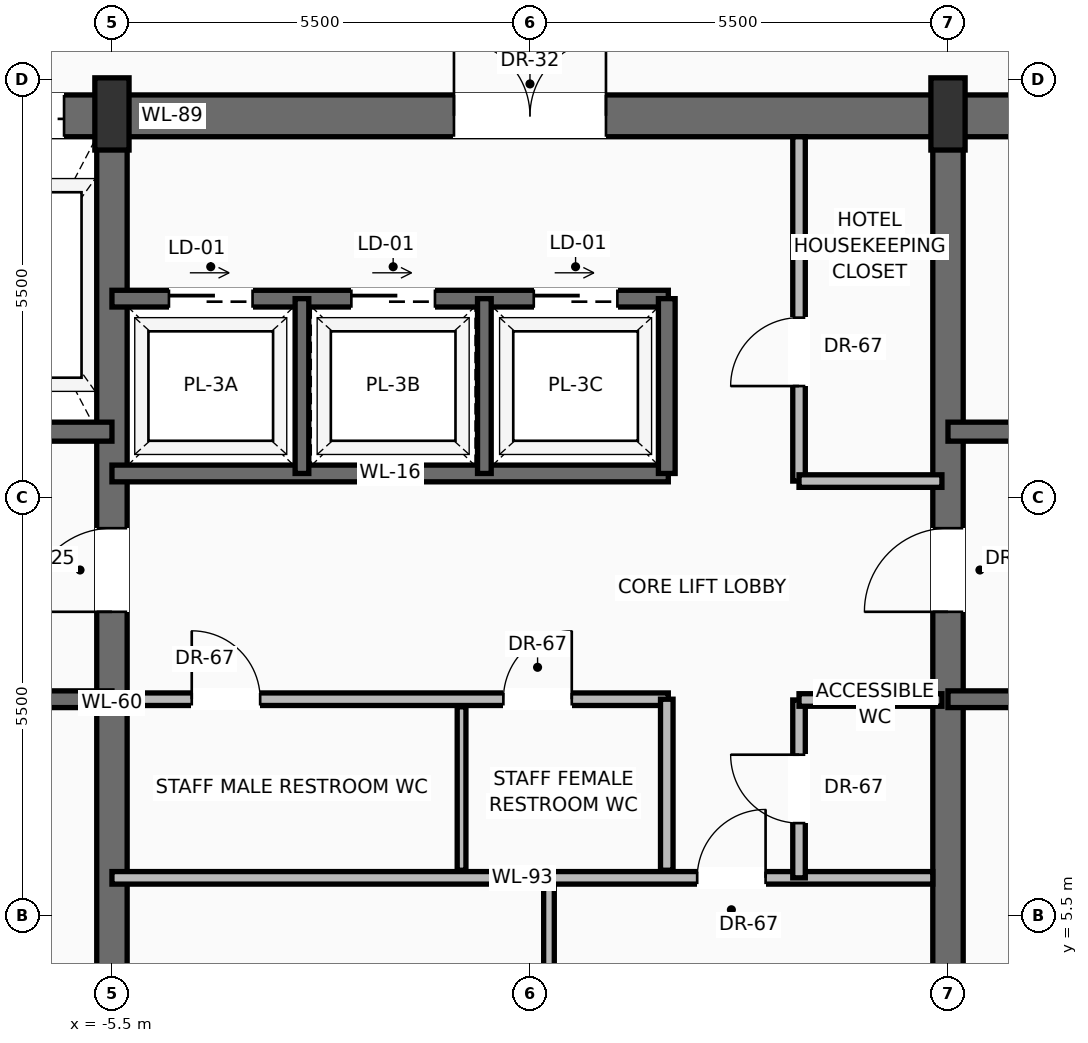
"""IFC4 building model, lengths in metres.
Left out: names, types, materials, properties, quantities, classifications, styles, units other than length and angle.
Written with IfcOpenShell. Run it as: python <this file> out.ifc"""

import sys

from ifc_helpers import new_model, si_unit, direction, frame, frame_2d, origin, origin_2d, place, context, subcontext, project, spatial, rectangle, extrude, source, transform, mapped, element, fill, save


model = new_model("IFC4")
c1 = context("Model", 3, precision=1e-05, world=origin(), true_north=direction((0.0, 1.0)))
c2 = subcontext(c1, "Body", "Model", "MODEL_VIEW")
j1 = project(units=[si_unit("LENGTHUNIT", "METRE"), si_unit("PLANEANGLEUNIT", "RADIAN")], contexts=[c1])
p1 = place(None, origin())
s1 = spatial("IfcSite", under=j1, at=p1, CompositionType="ELEMENT")
p2 = place(p1, origin())
s2 = spatial("IfcBuilding", under=s1, at=p2, CompositionType="ELEMENT")
p3 = place(p2, frame((0.0, 0.0, 244.15)))
s3 = spatial("IfcBuildingStorey", under=s2, at=p3, CompositionType="ELEMENT", Elevation=244.15)
p4 = place(p3, frame((-10.7, 16.025, 0.0), z_axis=(0.0, 0.0, 1.0), x_axis=(1.0, 0.0, 0.0)))
e1 = element("IfcWall", 1, at=p4, inside=s3, PredefinedType="SHEAR", context=c2, shape_type="SweptSolid", body=[
    extrude(rectangle(XDim=21.4, YDim=0.55, at=frame_2d((10.7, 0.0))), origin(), (0.0, 0.0, 1.0), 3.24),
])
p5 = place(p4, frame((3.27, 0.0, 0.0)))
e2 = element("IfcOpeningElement", 2, at=p5, cuts=e1, PredefinedType="OPENING", context=c2, shape_type="SweptSolid", body=[
    extrude(rectangle(XDim=1.3, YDim=2.3, at=frame_2d((0.65, 1.15))), frame((0.0, 0.285, 0.0), z_axis=(0.0, -1.0, 0.0), x_axis=(1.0, 0.0, 0.0)), (0.0, 0.0, 1.0), 0.57),
])
p6 = place(p4, frame((9.7, 0.0, 0.0)))
e3 = element("IfcOpeningElement", 3, at=p6, cuts=e1, PredefinedType="OPENING", context=c2, shape_type="SweptSolid", body=[
    extrude(rectangle(XDim=2.0, YDim=2.4, at=frame_2d((1.0, 1.2))), frame((0.0, 0.285, 0.0), z_axis=(0.0, -1.0, 0.0), x_axis=(1.0, 0.0, 0.0)), (0.0, 0.0, 1.0), 0.57),
])
p7 = place(p3, frame((-5.5, 0.575, 0.0), z_axis=(0.0, 0.0, 1.0), x_axis=(0.0, 1.0, 0.0)))
e4 = element("IfcWall", 4, at=p7, inside=s3, PredefinedType="SHEAR", context=c2, shape_type="SweptSolid", body=[
    extrude(rectangle(XDim=15.45, YDim=0.4, at=frame_2d((7.725, 0.0))), origin(), (0.0, 0.0, 1.0), 3.24),
])
p8 = place(p7, frame((8.925, 0.0, 0.0)))
e5 = element("IfcOpeningElement", 5, at=p8, cuts=e4, PredefinedType="OPENING", context=c2, shape_type="SweptSolid", body=[
    extrude(rectangle(XDim=1.1, YDim=2.2, at=frame_2d((0.55, 1.1))), frame((0.0, 0.21, 0.0), z_axis=(0.0, -1.0, 0.0), x_axis=(1.0, 0.0, 0.0)), (0.0, 0.0, 1.0), 0.42),
])
p9 = place(p3, frame((5.5, 0.575, 0.0), z_axis=(0.0, 0.0, 1.0), x_axis=(0.0, 1.0, 0.0)))
e6 = element("IfcWall", 6, at=p9, inside=s3, PredefinedType="SHEAR", context=c2, shape_type="SweptSolid", body=[
    extrude(rectangle(XDim=15.45, YDim=0.4, at=frame_2d((7.725, 0.0))), origin(), (0.0, 0.0, 1.0), 3.24),
])
p10 = place(p9, frame((8.925, 0.0, 0.0)))
e7 = element("IfcOpeningElement", 7, at=p10, cuts=e6, PredefinedType="OPENING", context=c2, shape_type="SweptSolid", body=[
    extrude(rectangle(XDim=1.1, YDim=2.2, at=frame_2d((0.55, 1.1))), frame((0.0, 0.21, 0.0), z_axis=(0.0, -1.0, 0.0), x_axis=(1.0, 0.0, 0.0)), (0.0, 0.0, 1.0), 0.42),
])
m1 = source(origin(), c2, "Body", "SweptSolid", [
    extrude(rectangle(XDim=0.45, YDim=0.95, at=origin_2d()), origin(), (0.0, 0.0, 1.0), 3.45),
])
for number, where, z_axis, x_axis in (
    (8, (-5.5, 16.05, 0.0), (0.0, 0.0, 1.0), (1.0, 0.0, 0.0)),
    (9, (5.5, 16.05, 0.0), (0.0, 0.0, 1.0), (1.0, 0.0, 0.0)),
):
    element("IfcColumn", number, at=place(p3, frame(where, z_axis=z_axis, x_axis=x_axis)), inside=s3, PredefinedType="PILASTER", context=c2, shape_type="MappedRepresentation", body=[
        mapped(m1, transform((0.0, 0.0, 0.0), scale=1.0)),
    ])
p11 = place(p3, frame((-5.5, 8.35, 0.0), z_axis=(0.0, 0.0, 1.0), x_axis=(-1.0, 0.0, 0.0)))
e10 = element("IfcWall", 10, at=p11, inside=s3, PredefinedType="SOLIDWALL", context=c2, shape_type="SweptSolid", body=[
    extrude(rectangle(XDim=4.65, YDim=0.22, at=frame_2d((2.325, 0.0))), origin(), (0.0, 0.0, 1.0), 3.24),
])
p12 = place(p11, frame((2.5, 0.0, 0.0)))
e11 = element("IfcOpeningElement", 11, at=p12, cuts=e10, PredefinedType="OPENING", context=c2, shape_type="SweptSolid", body=[
    extrude(rectangle(XDim=1.15, YDim=2.2, at=frame_2d((0.575, 1.1))), frame((0.0, 0.12, 0.0), z_axis=(0.0, -1.0, 0.0), x_axis=(1.0, 0.0, 0.0)), (0.0, 0.0, 1.0), 0.24),
])
p13 = place(p3, frame((-5.5, 11.87, 0.0), z_axis=(0.0, 0.0, 1.0), x_axis=(-1.0, 0.0, 0.0)))
e12 = element("IfcWall", 12, at=p13, inside=s3, PredefinedType="SOLIDWALL", context=c2, shape_type="SweptSolid", body=[
    extrude(rectangle(XDim=4.65, YDim=0.25, at=frame_2d((2.325, 0.0))), origin(), (0.0, 0.0, 1.0), 3.24),
])
p14 = place(p13, frame((2.95, 0.0, 0.0)))
e13 = element("IfcOpeningElement", 13, at=p14, cuts=e12, PredefinedType="OPENING", context=c2, shape_type="SweptSolid", body=[
    extrude(rectangle(XDim=1.2, YDim=2.25, at=frame_2d((0.6, 1.125))), frame((0.0, 0.135, 0.0), z_axis=(0.0, -1.0, 0.0), x_axis=(1.0, 0.0, 0.0)), (0.0, 0.0, 1.0), 0.27),
])
p15 = place(p3, frame((10.15, 8.35, 0.0), z_axis=(0.0, 0.0, 1.0), x_axis=(-1.0, 0.0, 0.0)))
e14 = element("IfcWall", 14, at=p15, inside=s3, PredefinedType="SOLIDWALL", context=c2, shape_type="SweptSolid", body=[
    extrude(rectangle(XDim=4.65, YDim=0.22, at=frame_2d((2.325, 0.0))), origin(), (0.0, 0.0, 1.0), 3.24),
])
p16 = place(p15, frame((1.0, 0.0, 0.0)))
e15 = element("IfcOpeningElement", 15, at=p16, cuts=e14, PredefinedType="OPENING", context=c2, shape_type="SweptSolid", body=[
    extrude(rectangle(XDim=1.15, YDim=2.2, at=frame_2d((0.575, 1.1))), frame((0.0, 0.12, 0.0), z_axis=(0.0, -1.0, 0.0), x_axis=(1.0, 0.0, 0.0)), (0.0, 0.0, 1.0), 0.24),
])
p17 = place(p3, frame((10.15, 11.87, 0.0), z_axis=(0.0, 0.0, 1.0), x_axis=(-1.0, 0.0, 0.0)))
e16 = element("IfcWall", 16, at=p17, inside=s3, PredefinedType="SOLIDWALL", context=c2, shape_type="SweptSolid", body=[
    extrude(rectangle(XDim=4.65, YDim=0.25, at=frame_2d((2.325, 0.0))), origin(), (0.0, 0.0, 1.0), 3.24),
])
p18 = place(p17, frame((0.5, 0.0, 0.0)))
e17 = element("IfcOpeningElement", 17, at=p18, cuts=e16, PredefinedType="OPENING", context=c2, shape_type="SweptSolid", body=[
    extrude(rectangle(XDim=1.2, YDim=2.25, at=frame_2d((0.6, 1.125))), frame((0.0, 0.135, 0.0), z_axis=(0.0, -1.0, 0.0), x_axis=(1.0, 0.0, 0.0)), (0.0, 0.0, 1.0), 0.27),
])
p19 = place(p3, frame((-5.5, 6.0, 0.0), z_axis=(0.0, 0.0, 1.0), x_axis=(1.0, 0.0, 0.0)))
e18 = element("IfcWall", 18, at=p19, inside=s3, PredefinedType="PARTITIONING", context=c2, shape_type="SweptSolid", body=[
    extrude(rectangle(XDim=10.8, YDim=0.165, at=frame_2d((5.4, 0.0))), origin(), (0.0, 0.0, 1.0), 3.232),
])
p20 = place(p19, frame((7.7, 0.0, 0.0)))
e19 = element("IfcOpeningElement", 19, at=p20, cuts=e18, PredefinedType="OPENING", context=c2, shape_type="SweptSolid", body=[
    extrude(rectangle(XDim=0.9, YDim=2.1, at=frame_2d((0.45, 1.05))), frame((0.0, 0.093, 0.0), z_axis=(0.0, -1.0, 0.0), x_axis=(1.0, 0.0, 0.0)), (0.0, 0.0, 1.0), 0.185),
])
p21 = place(p3, frame((0.25, 0.85, 0.0), z_axis=(0.0, 0.0, 1.0), x_axis=(0.0, 1.0, 0.0)))
e20 = element("IfcWall", 20, at=p21, inside=s3, PredefinedType="PARTITIONING", context=c2, shape_type="SweptSolid", body=[
    extrude(rectangle(XDim=5.03, YDim=0.14, at=frame_2d((2.515, 0.0))), origin(), (0.0, 0.0, 1.0), 3.232),
])
p22 = place(p21, frame((2.1, 0.0, 0.0)))
e21 = element("IfcOpeningElement", 21, at=p22, cuts=e20, PredefinedType="OPENING", context=c2, shape_type="SweptSolid", body=[
    extrude(rectangle(XDim=0.9, YDim=2.1, at=frame_2d((0.45, 1.05))), frame((0.0, 0.08, 0.0), z_axis=(0.0, -1.0, 0.0), x_axis=(1.0, 0.0, 0.0)), (0.0, 0.0, 1.0), 0.16),
])
p23 = place(p3, frame((3.54, 6.0, 0.0), z_axis=(0.0, 0.0, 1.0), x_axis=(0.0, 1.0, 0.0)))
e22 = element("IfcWall", 22, at=p23, inside=s3, PredefinedType="PARTITIONING", context=c2, shape_type="SweptSolid", body=[
    extrude(rectangle(XDim=2.34, YDim=0.165, at=frame_2d((1.17, 0.0))), origin(), (0.0, 0.0, 1.0), 3.232),
])
p24 = place(p23, frame((0.72, 0.0, 0.0)))
e23 = element("IfcOpeningElement", 23, at=p24, cuts=e22, PredefinedType="OPENING", context=c2, shape_type="SweptSolid", body=[
    extrude(rectangle(XDim=0.9, YDim=2.1, at=frame_2d((0.45, 1.05))), frame((0.0, 0.093, 0.0), z_axis=(0.0, -1.0, 0.0), x_axis=(1.0, 0.0, 0.0)), (0.0, 0.0, 1.0), 0.185),
])
p25 = place(p3, frame((3.54, 8.34, 0.0), z_axis=(0.0, 0.0, 1.0), x_axis=(1.0, 0.0, 0.0)))
e24 = element("IfcWall", 24, at=p25, inside=s3, PredefinedType="PARTITIONING", context=c2, shape_type="SweptSolid", body=[
    extrude(rectangle(XDim=1.88, YDim=0.165, at=frame_2d((0.94, 0.0))), origin(), (0.0, 0.0, 1.0), 3.232),
])
p26 = place(p3, frame((-5.3, 8.35, 0.0), z_axis=(0.0, 0.0, 1.0), x_axis=(1.0, 0.0, 0.0)))
e25 = element("IfcWall", 25, at=p26, inside=s3, PredefinedType="PARTITIONING", context=c2, shape_type="SweptSolid", body=[
    extrude(rectangle(XDim=7.12, YDim=0.165, at=frame_2d((3.56, 0.0))), origin(), (0.0, 0.0, 1.0), 3.232),
])
p27 = place(p26, frame((0.85, 0.0, 0.0)))
e26 = element("IfcOpeningElement", 26, at=p27, cuts=e25, PredefinedType="OPENING", context=c2, shape_type="SweptSolid", body=[
    extrude(rectangle(XDim=0.9, YDim=2.1, at=frame_2d((0.45, 1.05))), frame((0.0, 0.093, 0.0), z_axis=(0.0, -1.0, 0.0), x_axis=(1.0, 0.0, 0.0)), (0.0, 0.0, 1.0), 0.185),
])
p28 = place(p26, frame((4.95, 0.0, 0.0)))
e27 = element("IfcOpeningElement", 27, at=p28, cuts=e25, PredefinedType="OPENING", context=c2, shape_type="SweptSolid", body=[
    extrude(rectangle(XDim=0.9, YDim=2.1, at=frame_2d((0.45, 1.05))), frame((0.0, 0.093, 0.0), z_axis=(0.0, -1.0, 0.0), x_axis=(1.0, 0.0, 0.0)), (0.0, 0.0, 1.0), 0.185),
])
p29 = place(p3, frame((1.8, 6.1, 0.0), z_axis=(0.0, 0.0, 1.0), x_axis=(0.0, 1.0, 0.0)))
e28 = element("IfcWall", 28, at=p29, inside=s3, PredefinedType="PARTITIONING", context=c2, shape_type="SweptSolid", body=[
    extrude(rectangle(XDim=2.25, YDim=0.165, at=frame_2d((1.125, 0.0))), origin(), (0.0, 0.0, 1.0), 3.232),
])
p30 = place(p3, frame((-0.9, 6.1, 0.0), z_axis=(0.0, 0.0, 1.0), x_axis=(0.0, 1.0, 0.0)))
e29 = element("IfcWall", 29, at=p30, inside=s3, PredefinedType="PARTITIONING", context=c2, shape_type="SweptSolid", body=[
    extrude(rectangle(XDim=2.15, YDim=0.115, at=frame_2d((1.075, 0.0))), origin(), (0.0, 0.0, 1.0), 3.232),
])
p31 = place(p3, frame((-5.5, 11.32, 0.0), z_axis=(0.0, 0.0, 1.0), x_axis=(1.0, 0.0, 0.0)))
e30 = element("IfcWall", 30, at=p31, inside=s3, PredefinedType="SOLIDWALL", context=c2, shape_type="SweptSolid", body=[
    extrude(rectangle(XDim=7.32, YDim=0.22, at=frame_2d((3.66, 0.0))), origin(), (0.0, 0.0, 1.0), 3.24),
])
p32 = place(p3, frame((-5.5, 13.62, 0.0), z_axis=(0.0, 0.0, 1.0), x_axis=(1.0, 0.0, 0.0)))
e31 = element("IfcWall", 31, at=p32, inside=s3, PredefinedType="SOLIDWALL", context=c2, shape_type="SweptSolid", body=[
    extrude(rectangle(XDim=7.32, YDim=0.22, at=frame_2d((3.66, 0.0))), origin(), (0.0, 0.0, 1.0), 3.24),
])
p33 = place(p32, frame((0.75, 0.0, 0.0)))
e32 = element("IfcOpeningElement", 32, at=p33, cuts=e31, PredefinedType="OPENING", context=c2, shape_type="SweptSolid", body=[
    extrude(rectangle(XDim=1.1, YDim=2.2, at=frame_2d((0.55, 1.1))), frame((0.0, 0.12, 0.0), z_axis=(0.0, -1.0, 0.0), x_axis=(1.0, 0.0, 0.0)), (0.0, 0.0, 1.0), 0.24),
])
p34 = place(p32, frame((3.15, 0.0, 0.0)))
e33 = element("IfcOpeningElement", 33, at=p34, cuts=e31, PredefinedType="OPENING", context=c2, shape_type="SweptSolid", body=[
    extrude(rectangle(XDim=1.1, YDim=2.2, at=frame_2d((0.55, 1.1))), frame((0.0, 0.12, 0.0), z_axis=(0.0, -1.0, 0.0), x_axis=(1.0, 0.0, 0.0)), (0.0, 0.0, 1.0), 0.24),
])
p35 = place(p32, frame((5.55, 0.0, 0.0)))
e34 = element("IfcOpeningElement", 34, at=p35, cuts=e31, PredefinedType="OPENING", context=c2, shape_type="SweptSolid", body=[
    extrude(rectangle(XDim=1.1, YDim=2.2, at=frame_2d((0.55, 1.1))), frame((0.0, 0.12, 0.0), z_axis=(0.0, -1.0, 0.0), x_axis=(1.0, 0.0, 0.0)), (0.0, 0.0, 1.0), 0.24),
])
p36 = place(p3, frame((1.8, 11.32, 0.0), z_axis=(0.0, 0.0, 1.0), x_axis=(0.0, 1.0, 0.0)))
e35 = element("IfcWall", 35, at=p36, inside=s3, PredefinedType="SOLIDWALL", context=c2, shape_type="SweptSolid", body=[
    extrude(rectangle(XDim=2.3, YDim=0.22, at=frame_2d((1.15, 0.0))), origin(), (0.0, 0.0, 1.0), 3.24),
])
for number, where, z_axis, x_axis in (
    (36, (-3.0, 11.32, 0.0), (0.0, 0.0, 1.0), (0.0, 1.0, 0.0)),
    (37, (-0.6, 11.32, 0.0), (0.0, 0.0, 1.0), (0.0, 1.0, 0.0)),
):
    element("IfcWall", number, at=place(p3, frame(where, z_axis=z_axis, x_axis=x_axis)), inside=s3, PredefinedType="SOLIDWALL", context=c2, shape_type="SweptSolid", body=[
        extrude(rectangle(XDim=2.3, YDim=0.18, at=frame_2d((1.15, 0.0))), origin(), (0.0, 0.0, 1.0), 3.24),
    ])
p37 = place(p3, frame((3.54, 11.22, 0.0), z_axis=(0.0, 0.0, 1.0), x_axis=(0.0, 1.0, 0.0)))
e38 = element("IfcWall", 38, at=p37, inside=s3, PredefinedType="PARTITIONING", context=c2, shape_type="SweptSolid", body=[
    extrude(rectangle(XDim=4.53, YDim=0.165, at=frame_2d((2.265, 0.0))), origin(), (0.0, 0.0, 1.0), 3.232),
])
p38 = place(p37, frame((1.25, 0.0, 0.0)))
e39 = element("IfcOpeningElement", 39, at=p38, cuts=e38, PredefinedType="OPENING", context=c2, shape_type="SweptSolid", body=[
    extrude(rectangle(XDim=0.9, YDim=2.1, at=frame_2d((0.45, 1.05))), frame((0.0, 0.093, 0.0), z_axis=(0.0, -1.0, 0.0), x_axis=(1.0, 0.0, 0.0)), (0.0, 0.0, 1.0), 0.185),
])
p39 = place(p3, frame((3.54, 11.22, 0.0), z_axis=(0.0, 0.0, 1.0), x_axis=(1.0, 0.0, 0.0)))
e40 = element("IfcWall", 40, at=p39, inside=s3, PredefinedType="PARTITIONING", context=c2, shape_type="SweptSolid", body=[
    extrude(rectangle(XDim=1.88, YDim=0.165, at=frame_2d((0.94, 0.0))), origin(), (0.0, 0.0, 1.0), 3.232),
])
m2 = source(origin(), c2, "Body", "SweptSolid", [
    extrude(rectangle(XDim=1.1, YDim=2.2, at=frame_2d((0.55, 1.1))), frame((0.0, 0.025, 0.0), z_axis=(0.0, -1.0, 0.0), x_axis=(1.0, 0.0, 0.0)), (0.0, 0.0, 1.0), 0.05),
])
p40 = place(p8, origin())
e41 = element("IfcDoor", 41, at=p40, inside=s3, OperationType="SINGLE_SWING_LEFT", PredefinedType="DOOR", context=c2, shape_type="MappedRepresentation", body=[
    mapped(m2, transform((0.0, 0.0, 0.0), scale=1.0)),
])
fill(e5, e41)
m3 = source(origin(), c2, "Body", "SweptSolid", [
    extrude(rectangle(XDim=1.3, YDim=2.3, at=frame_2d((0.65, 1.15))), frame((0.0, 0.025, 0.0), z_axis=(0.0, -1.0, 0.0), x_axis=(1.0, 0.0, 0.0)), (0.0, 0.0, 1.0), 0.05),
])
p41 = place(p5, origin())
e42 = element("IfcDoor", 42, at=p41, inside=s3, OperationType="SLIDING_TO_RIGHT", PredefinedType="DOOR", context=c2, shape_type="MappedRepresentation", body=[
    mapped(m3, transform((0.0, 0.0, 0.0), scale=1.0)),
])
fill(e2, e42)
p42 = place(p10, origin())
e43 = element("IfcDoor", 43, at=p42, inside=s3, OperationType="SINGLE_SWING_LEFT", PredefinedType="DOOR", context=c2, shape_type="MappedRepresentation", body=[
    mapped(m2, transform((0.0, 0.0, 0.0), scale=1.0)),
])
fill(e7, e43)
m4 = source(origin(), c2, "Body", "SweptSolid", [
    extrude(rectangle(XDim=2.0, YDim=2.4, at=frame_2d((1.0, 1.2))), frame((0.0, 0.025, 0.0), z_axis=(0.0, -1.0, 0.0), x_axis=(1.0, 0.0, 0.0)), (0.0, 0.0, 1.0), 0.05),
])
p43 = place(p6, origin())
e44 = element("IfcDoor", 44, at=p43, inside=s3, OperationType="DOUBLE_DOOR_SINGLE_SWING", PredefinedType="DOOR", context=c2, shape_type="MappedRepresentation", body=[
    mapped(m4, transform((0.0, 0.0, 0.0), scale=1.0)),
])
fill(e3, e44)
m5 = source(origin(), c2, "Body", "SweptSolid", [
    extrude(rectangle(XDim=0.9, YDim=2.1, at=frame_2d((0.45, 1.05))), frame((0.0, 0.025, 0.0), z_axis=(0.0, -1.0, 0.0), x_axis=(1.0, 0.0, 0.0)), (0.0, 0.0, 1.0), 0.05),
])
p44 = place(p20, origin())
e45 = element("IfcDoor", 45, at=p44, inside=s3, OperationType="SINGLE_SWING_RIGHT", PredefinedType="DOOR", context=c2, shape_type="MappedRepresentation", body=[
    mapped(m5, transform((0.0, 0.0, 0.0), scale=1.0)),
])
fill(e19, e45)
p45 = place(p24, origin())
e46 = element("IfcDoor", 46, at=p45, inside=s3, OperationType="SINGLE_SWING_RIGHT", PredefinedType="DOOR", context=c2, shape_type="MappedRepresentation", body=[
    mapped(m5, transform((0.0, 0.0, 0.0), scale=1.0)),
])
fill(e23, e46)
p46 = place(p27, origin())
e47 = element("IfcDoor", 47, at=p46, inside=s3, OperationType="SINGLE_SWING_LEFT", PredefinedType="DOOR", context=c2, shape_type="MappedRepresentation", body=[
    mapped(m5, transform((0.0, 0.0, 0.0), scale=1.0)),
])
fill(e26, e47)
p47 = place(p28, origin())
e48 = element("IfcDoor", 48, at=p47, inside=s3, OperationType="SINGLE_SWING_RIGHT", PredefinedType="DOOR", context=c2, shape_type="MappedRepresentation", body=[
    mapped(m5, transform((0.0, 0.0, 0.0), scale=1.0)),
])
fill(e27, e48)
m6 = source(origin(), c2, "Body", "SweptSolid", [
    extrude(rectangle(XDim=1.1, YDim=2.2, at=frame_2d((0.55, 1.1))), frame((0.0, 0.025, 0.0), z_axis=(0.0, -1.0, 0.0), x_axis=(1.0, 0.0, 0.0)), (0.0, 0.0, 1.0), 0.05),
])
p48 = place(p33, origin())
e49 = element("IfcDoor", 49, at=p48, inside=s3, OperationType="SLIDING_TO_RIGHT", PredefinedType="DOOR", context=c2, shape_type="MappedRepresentation", body=[
    mapped(m6, transform((0.0, 0.0, 0.0), scale=1.0)),
])
fill(e32, e49)
p49 = place(p34, origin())
e50 = element("IfcDoor", 50, at=p49, inside=s3, OperationType="SLIDING_TO_RIGHT", PredefinedType="DOOR", context=c2, shape_type="MappedRepresentation", body=[
    mapped(m6, transform((0.0, 0.0, 0.0), scale=1.0)),
])
fill(e33, e50)
p50 = place(p35, origin())
e51 = element("IfcDoor", 51, at=p50, inside=s3, OperationType="SLIDING_TO_RIGHT", PredefinedType="DOOR", context=c2, shape_type="MappedRepresentation", body=[
    mapped(m6, transform((0.0, 0.0, 0.0), scale=1.0)),
])
fill(e34, e51)
p51 = place(p38, origin())
e52 = element("IfcDoor", 52, at=p51, inside=s3, OperationType="SINGLE_SWING_LEFT", PredefinedType="DOOR", context=c2, shape_type="MappedRepresentation", body=[
    mapped(m5, transform((0.0, 0.0, 0.0), scale=1.0)),
])
fill(e39, e52)
save(model, sys.argv[1])
